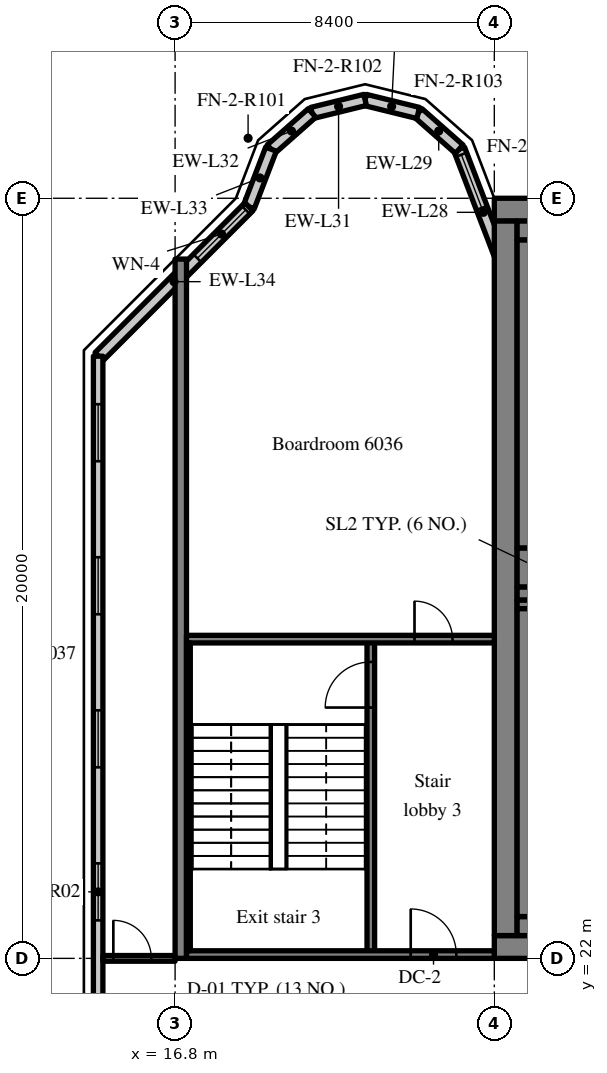
"""IFC4 building model, lengths in metres.
Left out: names, types, materials, properties, quantities, classifications, styles, units other than length and angle.
Written with IfcOpenShell. Run it as: python <this file> out.ifc"""

import sys

from ifc_helpers import new_model, si_unit, direction, frame, frame_2d, origin, place, context, subcontext, project, spatial, rectangle, extrude, source, transform, mapped, element, fill, save


model = new_model("IFC4")
c1 = context("Model", 3, precision=1e-05, world=origin(), true_north=direction((0.0, 1.0)))
c2 = subcontext(c1, "Body", "Model", "MODEL_VIEW")
j1 = project(units=[si_unit("LENGTHUNIT", "METRE"), si_unit("PLANEANGLEUNIT", "RADIAN")], contexts=[c1])
p1 = place(None, origin())
s1 = spatial("IfcSite", under=j1, at=p1, CompositionType="ELEMENT")
p2 = place(p1, origin())
s2 = spatial("IfcBuilding", under=s1, at=p2, CompositionType="ELEMENT")
p3 = place(p2, frame((0.0, 0.0, 249.1)))
s3 = spatial("IfcBuildingStorey", under=s2, at=p3, CompositionType="ELEMENT", Elevation=249.1)
m1 = source(origin(), c2, "Body", "SweptSolid", [
    extrude(rectangle(XDim=50.4, YDim=0.6, at=frame_2d((25.2, 0.0))), origin(), (0.0, 0.0, 1.0), 3.62),
])
p4 = place(p3, frame((25.2, 22.3, 0.0), z_axis=(0.0, 0.0, 1.0), x_axis=(1.0, 0.0, 0.0)))
e1 = element("IfcWall", 1, at=p4, inside=s3, PredefinedType="SHEAR", context=c2, shape_type="MappedRepresentation", body=[
    mapped(m1, transform((0.0, 0.0, 0.0), scale=1.0)),
])
m2 = source(origin(), c2, "Body", "SweptSolid", [
    extrude(rectangle(XDim=1.8, YDim=2.1, at=frame_2d((0.9, 1.05))), frame((0.0, 0.31, 0.0), z_axis=(0.0, -1.0, 0.0), x_axis=(1.0, 0.0, 0.0)), (0.0, 0.0, 1.0), 0.62),
])
p5 = place(p4, frame((15.9, 0.0, 0.0)))
e2 = element("IfcOpeningElement", 2, at=p5, cuts=e1, PredefinedType="OPENING", context=c2, shape_type="MappedRepresentation", body=[
    mapped(m2, transform((0.0, 0.0, 0.0), scale=1.0)),
])
m3 = source(origin(), c2, "Body", "SweptSolid", [
    extrude(rectangle(XDim=0.9, YDim=2.1, at=frame_2d((0.45, 1.05))), frame((0.0, 0.31, 0.0), z_axis=(0.0, -1.0, 0.0), x_axis=(1.0, 0.0, 0.0)), (0.0, 0.0, 1.0), 0.62),
])
p6 = place(p4, frame((21.513, 0.0, 0.0)))
e3 = element("IfcOpeningElement", 3, at=p6, cuts=e1, PredefinedType="OPENING", context=c2, shape_type="MappedRepresentation", body=[
    mapped(m3, transform((0.0, 0.0, 0.0), scale=1.0)),
])
p7 = place(p4, frame((32.7, 0.0, 0.0)))
e4 = element("IfcOpeningElement", 4, at=p7, cuts=e1, PredefinedType="OPENING", context=c2, shape_type="MappedRepresentation", body=[
    mapped(m2, transform((0.0, 0.0, 0.0), scale=1.0)),
])
m4 = source(origin(), c2, "Body", "SweptSolid", [
    extrude(rectangle(XDim=1.2, YDim=2.1, at=frame_2d((0.6, 1.05))), frame((0.0, 0.31, 0.0), z_axis=(0.0, -1.0, 0.0), x_axis=(1.0, 0.0, 0.0)), (0.0, 0.0, 1.0), 0.62),
])
p8 = place(p4, frame((6.488, 0.0, 0.0)))
e5 = element("IfcOpeningElement", 5, at=p8, cuts=e1, PredefinedType="OPENING", context=c2, shape_type="MappedRepresentation", body=[
    mapped(m4, transform((0.0, 0.0, 0.0), scale=1.0)),
])
p9 = place(p4, frame((47.925, 0.0, 0.0)))
e6 = element("IfcOpeningElement", 6, at=p9, cuts=e1, PredefinedType="OPENING", context=c2, shape_type="MappedRepresentation", body=[
    mapped(m4, transform((0.0, 0.0, 0.0), scale=1.0)),
])
p10 = place(p3, frame((25.2, 41.7, 0.0), z_axis=(0.0, 0.0, 1.0), x_axis=(1.0, 0.0, 0.0)))
e7 = element("IfcWall", 7, at=p10, inside=s3, PredefinedType="SHEAR", context=c2, shape_type="MappedRepresentation", body=[
    mapped(m1, transform((0.0, 0.0, 0.0), scale=1.0)),
])
m5 = source(origin(), c2, "Body", "SweptSolid", [
    extrude(rectangle(XDim=18.8, YDim=0.6, at=frame_2d((9.4, 0.0))), origin(), (0.0, 0.0, 1.0), 3.62),
])
p11 = place(p3, frame((25.5, 22.6, 0.0), z_axis=(0.0, 0.0, 1.0), x_axis=(0.0, 1.0, 0.0)))
e8 = element("IfcWall", 8, at=p11, inside=s3, PredefinedType="SHEAR", context=c2, shape_type="MappedRepresentation", body=[
    mapped(m5, transform((0.0, 0.0, 0.0), scale=1.0)),
])
m6 = source(origin(), c2, "Body", "SweptSolid", [
    extrude(rectangle(XDim=7.625, YDim=0.35, at=frame_2d((3.812, 0.0))), origin(), (0.0, 0.0, 1.0), 3.62),
])
p12 = place(p3, frame((25.8, 31.6, 0.0), z_axis=(0.0, 0.0, 1.0), x_axis=(1.0, 0.0, 0.0)))
e9 = element("IfcWall", 9, at=p12, inside=s3, PredefinedType="SHEAR", context=c2, shape_type="MappedRepresentation", body=[
    mapped(m6, transform((0.0, 0.0, 0.0), scale=1.0)),
])
m7 = source(origin(), c2, "Body", "SweptSolid", [
    extrude(rectangle(XDim=1.1, YDim=2.1, at=frame_2d((0.55, 1.05))), frame((0.0, 0.185, 0.0), z_axis=(0.0, -1.0, 0.0), x_axis=(1.0, 0.0, 0.0)), (0.0, 0.0, 1.0), 0.37),
])
p13 = place(p12, frame((5.938, 0.0, 0.0)))
e10 = element("IfcOpeningElement", 10, at=p13, cuts=e9, PredefinedType="OPENING", context=c2, shape_type="MappedRepresentation", body=[
    mapped(m7, transform((0.0, 0.0, 0.0), scale=1.0)),
])
m8 = source(origin(), c2, "Body", "SweptSolid", [
    extrude(rectangle(XDim=18.4, YDim=0.3, at=frame_2d((9.2, 0.0))), origin(), (0.0, 0.0, 1.0), 3.62),
])
p14 = place(p3, frame((16.95, 22.0, 0.0), z_axis=(0.0, 0.0, 1.0), x_axis=(0.0, 1.0, 0.0)))
e11 = element("IfcWall", 11, at=p14, inside=s3, PredefinedType="SHEAR", context=c2, shape_type="MappedRepresentation", body=[
    mapped(m8, transform((0.0, 0.0, 0.0), scale=1.0)),
])
m9 = source(origin(), c2, "Body", "SweptSolid", [
    extrude(rectangle(XDim=3.559, YDim=0.3, at=frame_2d((1.78, 0.0))), origin(), (0.0, 0.0, 1.0), 3.62),
])
p15 = place(p3, frame((25.55, 39.969, 0.0), z_axis=(0.0, 0.0, 1.0), x_axis=(-0.35779745313, 0.933799219604, 0.0)))
e12 = element("IfcWall", 12, at=p15, inside=s3, PredefinedType="SOLIDWALL", context=c2, shape_type="MappedRepresentation", body=[
    mapped(m9, transform((0.0, 0.0, 0.0), scale=1.0)),
])
m10 = source(origin(), c2, "Body", "SweptSolid", [
    extrude(rectangle(XDim=1.5, YDim=2.0, at=frame_2d((0.75, 1.0))), frame((0.0, 0.16, 0.0), z_axis=(0.0, -1.0, 0.0), x_axis=(1.0, 0.0, 0.0)), (0.0, 0.0, 1.0), 0.32),
])
p16 = place(p15, frame((1.903, 0.0, 0.9)))
e13 = element("IfcOpeningElement", 13, at=p16, cuts=e12, PredefinedType="OPENING", context=c2, shape_type="MappedRepresentation", body=[
    mapped(m10, transform((0.0, 0.0, 0.0), scale=1.0)),
])
m11 = source(origin(), c2, "Body", "SweptSolid", [
    extrude(rectangle(XDim=1.44, YDim=0.3, at=frame_2d((0.72, 0.0))), origin(), (0.0, 0.0, 1.0), 3.62),
])
p17 = place(p3, frame((24.277, 43.292, 0.0), z_axis=(0.0, 0.0, 1.0), x_axis=(-0.749649827867, 0.661834673902, 0.0)))
e14 = element("IfcWall", 14, at=p17, inside=s3, PredefinedType="SOLIDWALL", context=c2, shape_type="MappedRepresentation", body=[
    mapped(m11, transform((0.0, 0.0, 0.0), scale=1.0)),
])
m12 = source(origin(), c2, "Body", "SweptSolid", [
    extrude(rectangle(XDim=1.438, YDim=0.3, at=frame_2d((0.719, 0.0))), origin(), (0.0, 0.0, 1.0), 3.62),
])
p18 = place(p3, frame((23.197, 44.245, 0.0), z_axis=(0.0, 0.0, 1.0), x_axis=(-0.971152283879, 0.238460146601, 0.0)))
e15 = element("IfcWall", 15, at=p18, inside=s3, PredefinedType="SOLIDWALL", context=c2, shape_type="MappedRepresentation", body=[
    mapped(m12, transform((0.0, 0.0, 0.0), scale=1.0)),
])
m13 = source(origin(), c2, "Body", "SweptSolid", [
    extrude(rectangle(XDim=1.439, YDim=0.3, at=frame_2d((0.719, 0.0))), origin(), (0.0, 0.0, 1.0), 3.62),
])
p19 = place(p3, frame((21.8, 44.588, 0.0), z_axis=(0.0, 0.0, 1.0), x_axis=(-0.971161932466, -0.238420848351, 0.0)))
e16 = element("IfcWall", 16, at=p19, inside=s3, PredefinedType="SOLIDWALL", context=c2, shape_type="MappedRepresentation", body=[
    mapped(m13, transform((0.0, 0.0, 0.0), scale=1.0)),
])
m14 = source(origin(), c2, "Body", "SweptSolid", [
    extrude(rectangle(XDim=1.44, YDim=0.3, at=frame_2d((0.72, 0.0))), origin(), (0.0, 0.0, 1.0), 3.62),
])
p20 = place(p3, frame((20.403, 44.245, 0.0), z_axis=(0.0, 0.0, 1.0), x_axis=(-0.74957555648, -0.661918790432, 0.0)))
e17 = element("IfcWall", 17, at=p20, inside=s3, PredefinedType="SOLIDWALL", context=c2, shape_type="MappedRepresentation", body=[
    mapped(m14, transform((0.0, 0.0, 0.0), scale=1.0)),
])
m15 = source(origin(), c2, "Body", "SweptSolid", [
    extrude(rectangle(XDim=1.622, YDim=0.3, at=frame_2d((0.811, 0.0))), origin(), (0.0, 0.0, 1.0), 3.62),
])
p21 = place(p3, frame((19.323, 43.292, 0.0), z_axis=(0.0, 0.0, 1.0), x_axis=(-0.357778527068, -0.933806471154, 0.0)))
e18 = element("IfcWall", 18, at=p21, inside=s3, PredefinedType="SOLIDWALL", context=c2, shape_type="MappedRepresentation", body=[
    mapped(m15, transform((0.0, 0.0, 0.0), scale=1.0)),
])
m16 = source(origin(), c2, "Body", "SweptSolid", [
    extrude(rectangle(XDim=5.576, YDim=0.3, at=frame_2d((2.788, 0.0))), origin(), (0.0, 0.0, 1.0), 3.62),
])
p22 = place(p3, frame((18.743, 41.777, 0.0), z_axis=(0.0, 0.0, 1.0), x_axis=(-0.707106781187, -0.707106781187, 0.0)))
e19 = element("IfcWall", 19, at=p22, inside=s3, PredefinedType="SOLIDWALL", context=c2, shape_type="MappedRepresentation", body=[
    mapped(m16, transform((0.0, 0.0, 0.0), scale=1.0)),
])
m17 = source(origin(), c2, "Body", "SweptSolid", [
    extrude(rectangle(XDim=1.8, YDim=1.5, at=frame_2d((0.9, 0.75))), frame((0.0, 0.16, 0.0), z_axis=(0.0, -1.0, 0.0), x_axis=(1.0, 0.0, 0.0)), (0.0, 0.0, 1.0), 0.32),
])
p23 = place(p22, frame((0.118, 0.0, 0.9)))
e20 = element("IfcOpeningElement", 20, at=p23, cuts=e19, PredefinedType="OPENING", context=c2, shape_type="MappedRepresentation", body=[
    mapped(m17, transform((0.0, 0.0, 0.0), scale=1.0)),
])
m18 = source(origin(), c2, "Body", "SweptSolid", [
    extrude(rectangle(XDim=28.189, YDim=0.25, at=frame_2d((14.095, 0.0))), origin(), (0.0, 0.0, 1.0), 3.62),
])
p24 = place(p3, frame((14.775, 37.845, 0.0), z_axis=(0.0, 0.0, 1.0), x_axis=(0.0, -1.0, 0.0)))
e21 = element("IfcWall", 21, at=p24, inside=s3, PredefinedType="SOLIDWALL", context=c2, shape_type="MappedRepresentation", body=[
    mapped(m18, transform((0.0, 0.0, 0.0), scale=1.0)),
])
m19 = source(origin(), c2, "Body", "SweptSolid", [
    extrude(rectangle(XDim=1.5, YDim=1.5, at=frame_2d((0.75, 0.75))), frame((0.0, 0.135, 0.0), z_axis=(0.0, -1.0, 0.0), x_axis=(1.0, 0.0, 0.0)), (0.0, 0.0, 1.0), 0.27),
])
p25 = place(p24, frame((1.263, 0.0, 0.9)))
e22 = element("IfcOpeningElement", 22, at=p25, cuts=e21, PredefinedType="OPENING", context=c2, shape_type="MappedRepresentation", body=[
    mapped(m19, transform((0.0, 0.0, 0.0), scale=1.0)),
])
p26 = place(p24, frame((5.291, 0.0, 0.9)))
e23 = element("IfcOpeningElement", 23, at=p26, cuts=e21, PredefinedType="OPENING", context=c2, shape_type="MappedRepresentation", body=[
    mapped(m19, transform((0.0, 0.0, 0.0), scale=1.0)),
])
p27 = place(p24, frame((9.318, 0.0, 0.9)))
e24 = element("IfcOpeningElement", 24, at=p27, cuts=e21, PredefinedType="OPENING", context=c2, shape_type="MappedRepresentation", body=[
    mapped(m19, transform((0.0, 0.0, 0.0), scale=1.0)),
])
p28 = place(p24, frame((13.345, 0.0, 0.9)))
e25 = element("IfcOpeningElement", 25, at=p28, cuts=e21, PredefinedType="OPENING", context=c2, shape_type="MappedRepresentation", body=[
    mapped(m19, transform((0.0, 0.0, 0.0), scale=1.0)),
])
p29 = place(p24, frame((17.372, 0.0, 0.9)))
e26 = element("IfcOpeningElement", 26, at=p29, cuts=e21, PredefinedType="OPENING", context=c2, shape_type="MappedRepresentation", body=[
    mapped(m19, transform((0.0, 0.0, 0.0), scale=1.0)),
])
p30 = place(p24, frame((21.399, 0.0, 0.9)))
e27 = element("IfcOpeningElement", 27, at=p30, cuts=e21, PredefinedType="OPENING", context=c2, shape_type="MappedRepresentation", body=[
    mapped(m19, transform((0.0, 0.0, 0.0), scale=1.0)),
])
p31 = place(p24, frame((25.426, 0.0, 0.9)))
e28 = element("IfcOpeningElement", 28, at=p31, cuts=e21, PredefinedType="OPENING", context=c2, shape_type="MappedRepresentation", body=[
    mapped(m19, transform((0.0, 0.0, 0.0), scale=1.0)),
])
m20 = source(origin(), c2, "Body", "SweptSolid", [
    extrude(rectangle(XDim=8.3, YDim=0.2, at=frame_2d((4.15, 0.0))), origin(), (0.0, 0.0, 1.0), 3.62),
])
p32 = place(p3, frame((21.95, 22.1, 0.0), z_axis=(0.0, 0.0, 1.0), x_axis=(0.0, 1.0, 0.0)))
e29 = element("IfcWall", 29, at=p32, inside=s3, PredefinedType="SOLIDWALL", context=c2, shape_type="MappedRepresentation", body=[
    mapped(m20, transform((0.0, 0.0, 0.0), scale=1.0)),
])
m21 = source(origin(), c2, "Body", "SweptSolid", [
    extrude(rectangle(XDim=1.2, YDim=2.1, at=frame_2d((0.6, 1.05))), frame((0.0, 0.11, 0.0), z_axis=(0.0, -1.0, 0.0), x_axis=(1.0, 0.0, 0.0)), (0.0, 0.0, 1.0), 0.22),
])
p33 = place(p32, frame((6.5, 0.0, 0.0)))
e30 = element("IfcOpeningElement", 30, at=p33, cuts=e29, PredefinedType="OPENING", context=c2, shape_type="MappedRepresentation", body=[
    mapped(m21, transform((0.0, 0.0, 0.0), scale=1.0)),
])
m22 = source(origin(), c2, "Body", "SweptSolid", [
    extrude(rectangle(XDim=8.1, YDim=0.2, at=frame_2d((4.05, 0.0))), origin(), (0.0, 0.0, 1.0), 3.62),
])
p34 = place(p3, frame((17.1, 22.1, 0.0), z_axis=(0.0, 0.0, 1.0), x_axis=(1.0, 0.0, 0.0)))
e31 = element("IfcWall", 31, at=p34, inside=s3, PredefinedType="SOLIDWALL", context=c2, shape_type="MappedRepresentation", body=[
    mapped(m22, transform((0.0, 0.0, 0.0), scale=1.0)),
])
p35 = place(p34, frame((5.9, 0.0, 0.0)))
e32 = element("IfcOpeningElement", 32, at=p35, cuts=e31, PredefinedType="OPENING", context=c2, shape_type="MappedRepresentation", body=[
    mapped(m21, transform((0.0, 0.0, 0.0), scale=1.0)),
])
p36 = place(p3, frame((17.1, 30.4, 0.0), z_axis=(0.0, 0.0, 1.0), x_axis=(1.0, 0.0, 0.0)))
e33 = element("IfcWall", 33, at=p36, inside=s3, PredefinedType="SOLIDWALL", context=c2, shape_type="MappedRepresentation", body=[
    mapped(m22, transform((0.0, 0.0, 0.0), scale=1.0)),
])
m23 = source(origin(), c2, "Body", "SweptSolid", [
    extrude(rectangle(XDim=1.0, YDim=2.1, at=frame_2d((0.5, 1.05))), frame((0.0, 0.11, 0.0), z_axis=(0.0, -1.0, 0.0), x_axis=(1.0, 0.0, 0.0)), (0.0, 0.0, 1.0), 0.22),
])
p37 = place(p36, frame((6.0, 0.0, 0.0)))
e34 = element("IfcOpeningElement", 34, at=p37, cuts=e33, PredefinedType="OPENING", context=c2, shape_type="MappedRepresentation", body=[
    mapped(m23, transform((0.0, 0.0, 0.0), scale=1.0)),
])
m24 = source(origin(), c2, "Body", "SweptSolid", [
    extrude(rectangle(XDim=5.15, YDim=0.5, at=frame_2d((2.575, 0.0))), origin(), (0.0, 0.0, 1.0), 3.62),
])
p38 = place(p3, frame((25.8, 22.85, 0.0), z_axis=(0.0, 0.0, 1.0), x_axis=(1.0, 0.0, 0.0)))
e35 = element("IfcWall", 35, at=p38, inside=s3, PredefinedType="SOLIDWALL", context=c2, shape_type="MappedRepresentation", body=[
    mapped(m24, transform((0.0, 0.0, 0.0), scale=1.0)),
])
m25 = source(origin(), c2, "Body", "SweptSolid", [
    extrude(rectangle(XDim=5.15, YDim=0.225, at=frame_2d((2.575, 0.0))), origin(), (0.0, 0.0, 1.0), 3.62),
])
p39 = place(p3, frame((25.8, 31.312, 0.0), z_axis=(0.0, 0.0, 1.0), x_axis=(1.0, 0.0, 0.0)))
e36 = element("IfcWall", 36, at=p39, inside=s3, PredefinedType="SOLIDWALL", context=c2, shape_type="MappedRepresentation", body=[
    mapped(m25, transform((0.0, 0.0, 0.0), scale=1.0)),
])
m26 = source(origin(), c2, "Body", "SweptSolid", [
    extrude(rectangle(XDim=8.1, YDim=0.5, at=frame_2d((4.05, 0.0))), origin(), (0.0, 0.0, 1.0), 3.62),
])
p40 = place(p3, frame((26.05, 23.1, 0.0), z_axis=(0.0, 0.0, 1.0), x_axis=(0.0, 1.0, 0.0)))
e37 = element("IfcWall", 37, at=p40, inside=s3, PredefinedType="SOLIDWALL", context=c2, shape_type="MappedRepresentation", body=[
    mapped(m26, transform((0.0, 0.0, 0.0), scale=1.0)),
])
m27 = source(origin(), c2, "Body", "SweptSolid", [
    extrude(rectangle(XDim=8.1, YDim=0.1, at=frame_2d((4.05, 0.0))), origin(), (0.0, 0.0, 1.0), 3.62),
])
p41 = place(p3, frame((17.15, 22.2, 0.0), z_axis=(0.0, 0.0, 1.0), x_axis=(0.0, 1.0, 0.0)))
e38 = element("IfcWall", 38, at=p41, inside=s3, PredefinedType="SOLIDWALL", context=c2, shape_type="MappedRepresentation", body=[
    mapped(m27, transform((0.0, 0.0, 0.0), scale=1.0)),
])
p42 = place(p3, frame((25.8, 41.15, 0.0), z_axis=(0.0, 0.0, 1.0), x_axis=(1.0, 0.0, 0.0)))
e39 = element("IfcWall", 39, at=p42, inside=s3, PredefinedType="SOLIDWALL", context=c2, shape_type="MappedRepresentation", body=[
    mapped(m24, transform((0.0, 0.0, 0.0), scale=1.0)),
])
m28 = source(origin(), c2, "Body", "SweptSolid", [
    extrude(rectangle(XDim=5.15, YDim=1.025, at=frame_2d((2.575, 0.0))), origin(), (0.0, 0.0, 1.0), 3.62),
])
p43 = place(p3, frame((25.8, 32.287, 0.0), z_axis=(0.0, 0.0, 1.0), x_axis=(1.0, 0.0, 0.0)))
e40 = element("IfcWall", 40, at=p43, inside=s3, PredefinedType="SOLIDWALL", context=c2, shape_type="MappedRepresentation", body=[
    mapped(m28, transform((0.0, 0.0, 0.0), scale=1.0)),
])
p44 = place(p3, frame((26.05, 32.8, 0.0), z_axis=(0.0, 0.0, 1.0), x_axis=(0.0, 1.0, 0.0)))
e41 = element("IfcWall", 41, at=p44, inside=s3, PredefinedType="SOLIDWALL", context=c2, shape_type="MappedRepresentation", body=[
    mapped(m26, transform((0.0, 0.0, 0.0), scale=1.0)),
])
m29 = source(origin(), c2, "Body", "SweptSolid", [
    extrude(rectangle(XDim=1.9, YDim=0.15, at=frame_2d((0.95, 0.0))), origin(), (0.0, 0.0, 1.0), 2.92),
])
p45 = place(p3, frame((14.9, 22.0, 0.0), z_axis=(0.0, 0.0, 1.0), x_axis=(1.0, 0.0, 0.0)))
e42 = element("IfcWall", 42, at=p45, inside=s3, PredefinedType="PARTITIONING", context=c2, shape_type="MappedRepresentation", body=[
    mapped(m29, transform((0.0, 0.0, 0.0), scale=1.0)),
])
m30 = source(origin(), c2, "Body", "SweptSolid", [
    extrude(rectangle(XDim=1.0, YDim=2.1, at=frame_2d((0.5, 1.05))), frame((0.0, 0.085, 0.0), z_axis=(0.0, -1.0, 0.0), x_axis=(1.0, 0.0, 0.0)), (0.0, 0.0, 1.0), 0.17),
])
p46 = place(p45, frame((0.275, 0.0, 0.0)))
e43 = element("IfcOpeningElement", 43, at=p46, cuts=e42, PredefinedType="OPENING", context=c2, shape_type="MappedRepresentation", body=[
    mapped(m30, transform((0.0, 0.0, 0.0), scale=1.0)),
])
m31 = source(origin(), c2, "Body", "SweptSolid", [
    extrude(rectangle(XDim=1.5, YDim=2.0, at=frame_2d((0.75, 1.0))), frame((0.0, 0.03, 0.0), z_axis=(0.0, -1.0, 0.0), x_axis=(1.0, 0.0, 0.0)), (0.0, 0.0, 1.0), 0.06),
])
p47 = place(p16, origin())
e44 = element("IfcWindow", 44, at=p47, inside=s3, PartitioningType="SINGLE_PANEL", PredefinedType="WINDOW", context=c2, shape_type="MappedRepresentation", body=[
    mapped(m31, transform((0.0, 0.0, 0.0), scale=1.0)),
])
fill(e13, e44)
m32 = source(origin(), c2, "Body", "SweptSolid", [
    extrude(rectangle(XDim=1.8, YDim=1.5, at=frame_2d((0.9, 0.75))), frame((0.0, 0.03, 0.0), z_axis=(0.0, -1.0, 0.0), x_axis=(1.0, 0.0, 0.0)), (0.0, 0.0, 1.0), 0.06),
])
p48 = place(p23, origin())
e45 = element("IfcWindow", 45, at=p48, inside=s3, PartitioningType="SINGLE_PANEL", PredefinedType="WINDOW", context=c2, shape_type="MappedRepresentation", body=[
    mapped(m32, transform((0.0, 0.0, 0.0), scale=1.0)),
])
fill(e20, e45)
m33 = source(origin(), c2, "Body", "SweptSolid", [
    extrude(rectangle(XDim=1.5, YDim=1.5, at=frame_2d((0.75, 0.75))), frame((0.0, 0.03, 0.0), z_axis=(0.0, -1.0, 0.0), x_axis=(1.0, 0.0, 0.0)), (0.0, 0.0, 1.0), 0.06),
])
p49 = place(p25, origin())
e46 = element("IfcWindow", 46, at=p49, inside=s3, PartitioningType="SINGLE_PANEL", PredefinedType="WINDOW", context=c2, shape_type="MappedRepresentation", body=[
    mapped(m33, transform((0.0, 0.0, 0.0), scale=1.0)),
])
fill(e22, e46)
p50 = place(p26, origin())
e47 = element("IfcWindow", 47, at=p50, inside=s3, PartitioningType="SINGLE_PANEL", PredefinedType="WINDOW", context=c2, shape_type="MappedRepresentation", body=[
    mapped(m33, transform((0.0, 0.0, 0.0), scale=1.0)),
])
fill(e23, e47)
p51 = place(p27, origin())
e48 = element("IfcWindow", 48, at=p51, inside=s3, PartitioningType="SINGLE_PANEL", PredefinedType="WINDOW", context=c2, shape_type="MappedRepresentation", body=[
    mapped(m33, transform((0.0, 0.0, 0.0), scale=1.0)),
])
fill(e24, e48)
p52 = place(p28, origin())
e49 = element("IfcWindow", 49, at=p52, inside=s3, PartitioningType="SINGLE_PANEL", PredefinedType="WINDOW", context=c2, shape_type="MappedRepresentation", body=[
    mapped(m33, transform((0.0, 0.0, 0.0), scale=1.0)),
])
fill(e25, e49)
m34 = source(origin(), c2, "Body", "SweptSolid", [
    extrude(rectangle(XDim=1.2, YDim=2.1, at=frame_2d((0.6, 1.05))), frame((0.0, 0.025, 0.0), z_axis=(0.0, -1.0, 0.0), x_axis=(1.0, 0.0, 0.0)), (0.0, 0.0, 1.0), 0.05),
])
p53 = place(p33, origin())
e50 = element("IfcDoor", 50, at=p53, inside=s3, OperationType="SINGLE_SWING_LEFT", PredefinedType="DOOR", context=c2, shape_type="MappedRepresentation", body=[
    mapped(m34, transform((0.0, 0.0, 0.0), scale=1.0)),
])
fill(e30, e50)
p54 = place(p35, origin())
e51 = element("IfcDoor", 51, at=p54, inside=s3, OperationType="SINGLE_SWING_LEFT", PredefinedType="DOOR", context=c2, shape_type="MappedRepresentation", body=[
    mapped(m34, transform((0.0, 0.0, 0.0), scale=1.0)),
])
fill(e32, e51)
m35 = source(origin(), c2, "Body", "SweptSolid", [
    extrude(rectangle(XDim=1.0, YDim=2.1, at=frame_2d((0.5, 1.05))), frame((0.0, 0.025, 0.0), z_axis=(0.0, -1.0, 0.0), x_axis=(1.0, 0.0, 0.0)), (0.0, 0.0, 1.0), 0.05),
])
p55 = place(p37, origin())
e52 = element("IfcDoor", 52, at=p55, inside=s3, OperationType="SINGLE_SWING_LEFT", PredefinedType="DOOR", context=c2, shape_type="MappedRepresentation", body=[
    mapped(m35, transform((0.0, 0.0, 0.0), scale=1.0)),
])
fill(e34, e52)
p56 = place(p46, origin())
e53 = element("IfcDoor", 53, at=p56, inside=s3, OperationType="SINGLE_SWING_LEFT", PredefinedType="DOOR", context=c2, shape_type="MappedRepresentation", body=[
    mapped(m35, transform((0.0, 0.0, 0.0), scale=1.0)),
])
fill(e43, e53)
save(model, sys.argv[1])
